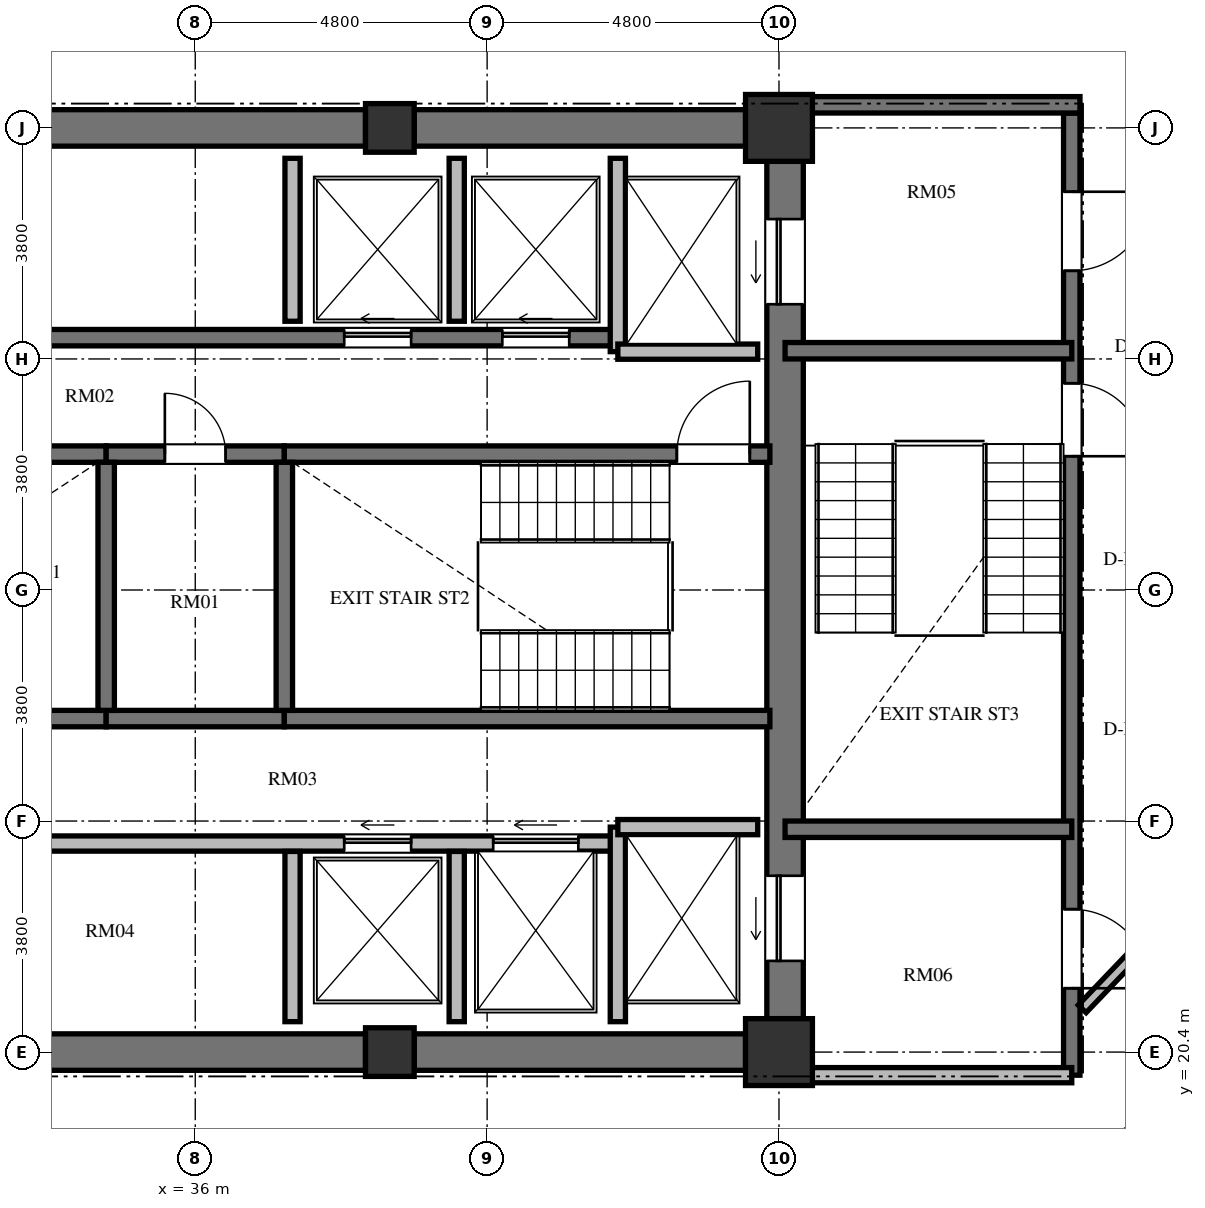
"""IFC4 building model, lengths in metres.
Left out: names, types, materials, properties, quantities, classifications, styles, units other than length and angle.
Written with IfcOpenShell. Run it as: python <this file> out.ifc"""

import sys

from ifc_helpers import new_model, si_unit, direction, frame, frame_2d, origin, origin_2d, place, context, subcontext, project, spatial, rectangle, extrude, element, fill, save


model = new_model("IFC4")
c1 = context("Model", 3, precision=1e-05, world=origin(), true_north=direction((0.0, 1.0)))
c2 = subcontext(c1, "Body", "Model", "MODEL_VIEW")
j1 = project(units=[si_unit("LENGTHUNIT", "METRE"), si_unit("PLANEANGLEUNIT", "RADIAN")], contexts=[c1])
p1 = place(None, origin())
s1 = spatial("IfcSite", under=j1, at=p1, CompositionType="ELEMENT")
p2 = place(p1, origin())
s2 = spatial("IfcBuilding", under=s1, at=p2, CompositionType="ELEMENT")
p3 = place(p2, frame((0.0, 0.0, 198.48)))
s3 = spatial("IfcBuildingStorey", under=s2, at=p3, CompositionType="ELEMENT", Elevation=198.48)
p4 = place(p3, frame((39.2, 20.4, 0.0), z_axis=(0.0, 0.0, 1.0), x_axis=(1.0, 0.0, 0.0)))
e1 = element("IfcColumn", 1, at=p4, inside=s3, PredefinedType="COLUMN", context=c2, shape_type="SweptSolid", body=[
    extrude(rectangle(XDim=0.8, YDim=0.8, at=origin_2d()), origin(), (0.0, 0.0, 1.0), 3.648),
])
for number, where, z_axis, x_axis in (
    (2, (45.6, 20.4, 0.0), (0.0, 0.0, 1.0), (1.0, 0.0, 0.0)),
    (3, (45.6, 35.6, 0.0), (0.0, 0.0, 1.0), (1.0, 0.0, 0.0)),
):
    element("IfcColumn", number, at=place(p3, frame(where, z_axis=z_axis, x_axis=x_axis)), inside=s3, PredefinedType="COLUMN", context=c2, shape_type="SweptSolid", body=[
        extrude(rectangle(XDim=1.1, YDim=1.1, at=origin_2d()), origin(), (0.0, 0.0, 1.0), 3.648),
    ])
p5 = place(p3, frame((39.2, 35.6, 0.0), z_axis=(0.0, 0.0, 1.0), x_axis=(1.0, 0.0, 0.0)))
e4 = element("IfcColumn", 4, at=p5, inside=s3, PredefinedType="COLUMN", context=c2, shape_type="SweptSolid", body=[
    extrude(rectangle(XDim=0.8, YDim=0.8, at=origin_2d()), origin(), (0.0, 0.0, 1.0), 3.648),
])
p6 = place(p3, frame((45.7, 20.95, 0.0), z_axis=(0.0, 0.0, 1.0), x_axis=(0.0, 1.0, 0.0)))
e5 = element("IfcWall", 5, at=p6, inside=s3, PredefinedType="SHEAR", context=c2, shape_type="SweptSolid", body=[
    extrude(rectangle(XDim=14.1, YDim=0.6, at=frame_2d((7.05, 0.0))), origin(), (0.0, 0.0, 1.0), 3.648),
])
p7 = place(p6, frame((11.75, 0.0, 0.0)))
e6 = element("IfcOpeningElement", 6, at=p7, cuts=e5, PredefinedType="OPENING", context=c2, shape_type="SweptSolid", body=[
    extrude(rectangle(XDim=1.4, YDim=2.3, at=frame_2d((0.7, 1.15))), frame((0.0, 0.31, 0.0), z_axis=(0.0, -1.0, 0.0), x_axis=(1.0, 0.0, 0.0)), (0.0, 0.0, 1.0), 0.62),
])
p8 = place(p6, frame((0.95, 0.0, 0.0)))
e7 = element("IfcOpeningElement", 7, at=p8, cuts=e5, PredefinedType="OPENING", context=c2, shape_type="SweptSolid", body=[
    extrude(rectangle(XDim=1.4, YDim=2.3, at=frame_2d((0.7, 1.15))), frame((0.0, 0.31, 0.0), z_axis=(0.0, -1.0, 0.0), x_axis=(1.0, 0.0, 0.0)), (0.0, 0.0, 1.0), 0.62),
])
for number, where, z_axis, x_axis in (
    (8, (33.2, 20.4, 0.0), (0.0, 0.0, 1.0), (1.0, 0.0, 0.0)),
    (9, (33.2, 35.6, 0.0), (0.0, 0.0, 1.0), (1.0, 0.0, 0.0)),
):
    element("IfcWall", number, at=place(p3, frame(where, z_axis=z_axis, x_axis=x_axis)), inside=s3, PredefinedType="SHEAR", context=c2, shape_type="SweptSolid", body=[
        extrude(rectangle(XDim=5.6, YDim=0.6, at=frame_2d((2.8, 0.0))), origin(), (0.0, 0.0, 1.0), 3.648),
    ])
for number, where, z_axis, x_axis in (
    (10, (39.6, 20.4, 0.0), (0.0, 0.0, 1.0), (1.0, 0.0, 0.0)),
    (11, (39.6, 35.6, 0.0), (0.0, 0.0, 1.0), (1.0, 0.0, 0.0)),
):
    element("IfcWall", number, at=place(p3, frame(where, z_axis=z_axis, x_axis=x_axis)), inside=s3, PredefinedType="SHEAR", context=c2, shape_type="SweptSolid", body=[
        extrude(rectangle(XDim=5.45, YDim=0.6, at=frame_2d((2.725, 0.0))), origin(), (0.0, 0.0, 1.0), 3.648),
    ])
p9 = place(p3, frame((26.55, 30.235, 0.0), z_axis=(0.0, 0.0, 1.0), x_axis=(1.0, 0.0, 0.0)))
e12 = element("IfcWall", 12, at=p9, inside=s3, PredefinedType="SHEAR", context=c2, shape_type="SweptSolid", body=[
    extrude(rectangle(XDim=7.985, YDim=0.27, at=frame_2d((3.992, 0.0))), origin(), (0.0, 0.0, 1.0), 3.648),
])
p10 = place(p3, frame((34.535, 30.235, 0.0), z_axis=(0.0, 0.0, 1.0), x_axis=(1.0, 0.0, 0.0)))
e13 = element("IfcWall", 13, at=p10, inside=s3, PredefinedType="SHEAR", context=c2, shape_type="SweptSolid", body=[
    extrude(rectangle(XDim=2.93, YDim=0.27, at=frame_2d((1.465, 0.0))), origin(), (0.0, 0.0, 1.0), 3.648),
])
p11 = place(p10, frame((0.965, 0.0, 0.0)))
e14 = element("IfcOpeningElement", 14, at=p11, cuts=e13, PredefinedType="OPENING", context=c2, shape_type="SweptSolid", body=[
    extrude(rectangle(XDim=1.0, YDim=2.1, at=frame_2d((0.5, 1.05))), frame((0.0, 0.145, 0.0), z_axis=(0.0, -1.0, 0.0), x_axis=(1.0, 0.0, 0.0)), (0.0, 0.0, 1.0), 0.29),
])
p12 = place(p3, frame((37.465, 30.235, 0.0), z_axis=(0.0, 0.0, 1.0), x_axis=(1.0, 0.0, 0.0)))
e15 = element("IfcWall", 15, at=p12, inside=s3, PredefinedType="SHEAR", context=c2, shape_type="SweptSolid", body=[
    extrude(rectangle(XDim=7.985, YDim=0.27, at=frame_2d((3.992, 0.0))), origin(), (0.0, 0.0, 1.0), 3.648),
])
p13 = place(p12, frame((6.455, 0.0, 0.0)))
e16 = element("IfcOpeningElement", 16, at=p13, cuts=e15, PredefinedType="OPENING", context=c2, shape_type="SweptSolid", body=[
    extrude(rectangle(XDim=1.2, YDim=2.15, at=frame_2d((0.6, 1.075))), frame((0.0, 0.145, 0.0), z_axis=(0.0, -1.0, 0.0), x_axis=(1.0, 0.0, 0.0)), (0.0, 0.0, 1.0), 0.29),
])
p14 = place(p3, frame((26.55, 25.885, 0.0), z_axis=(0.0, 0.0, 1.0), x_axis=(1.0, 0.0, 0.0)))
e17 = element("IfcWall", 17, at=p14, inside=s3, PredefinedType="SHEAR", context=c2, shape_type="SweptSolid", body=[
    extrude(rectangle(XDim=7.985, YDim=0.27, at=frame_2d((3.992, 0.0))), origin(), (0.0, 0.0, 1.0), 3.648),
])
p15 = place(p3, frame((34.535, 25.885, 0.0), z_axis=(0.0, 0.0, 1.0), x_axis=(1.0, 0.0, 0.0)))
e18 = element("IfcWall", 18, at=p15, inside=s3, PredefinedType="SHEAR", context=c2, shape_type="SweptSolid", body=[
    extrude(rectangle(XDim=2.93, YDim=0.27, at=frame_2d((1.465, 0.0))), origin(), (0.0, 0.0, 1.0), 3.648),
])
p16 = place(p3, frame((37.465, 25.885, 0.0), z_axis=(0.0, 0.0, 1.0), x_axis=(1.0, 0.0, 0.0)))
e19 = element("IfcWall", 19, at=p16, inside=s3, PredefinedType="SHEAR", context=c2, shape_type="SweptSolid", body=[
    extrude(rectangle(XDim=7.985, YDim=0.27, at=frame_2d((3.992, 0.0))), origin(), (0.0, 0.0, 1.0), 3.648),
])
for number, where, z_axis, x_axis in (
    (20, (34.535, 26.02, 0.0), (0.0, 0.0, 1.0), (0.0, 1.0, 0.0)),
    (21, (37.465, 26.02, 0.0), (0.0, 0.0, 1.0), (0.0, 1.0, 0.0)),
):
    element("IfcWall", number, at=place(p3, frame(where, z_axis=z_axis, x_axis=x_axis)), inside=s3, PredefinedType="SHEAR", context=c2, shape_type="SweptSolid", body=[
        extrude(rectangle(XDim=4.08, YDim=0.27, at=frame_2d((2.04, 0.0))), origin(), (0.0, 0.0, 1.0), 3.648),
    ])
p17 = place(p3, frame((26.55, 32.15, 0.0), z_axis=(0.0, 0.0, 1.0), x_axis=(1.0, 0.0, 0.0)))
e22 = element("IfcWall", 22, at=p17, inside=s3, PredefinedType="SHEAR", context=c2, shape_type="SweptSolid", body=[
    extrude(rectangle(XDim=16.4, YDim=0.27, at=frame_2d((8.2, 0.0))), origin(), (0.0, 0.0, 1.0), 3.648),
])
p18 = place(p17, frame((5.125, 0.0, 0.0)))
e23 = element("IfcOpeningElement", 23, at=p18, cuts=e22, PredefinedType="OPENING", context=c2, shape_type="SweptSolid", body=[
    extrude(rectangle(XDim=1.05, YDim=2.15, at=frame_2d((0.525, 1.075))), frame((0.0, 0.145, 0.0), z_axis=(0.0, -1.0, 0.0), x_axis=(1.0, 0.0, 0.0)), (0.0, 0.0, 1.0), 0.29),
])
p19 = place(p17, frame((11.9, 0.0, 0.0)))
e24 = element("IfcOpeningElement", 24, at=p19, cuts=e22, PredefinedType="OPENING", context=c2, shape_type="SweptSolid", body=[
    extrude(rectangle(XDim=1.1, YDim=2.2, at=frame_2d((0.55, 1.1))), frame((0.0, 0.145, 0.0), z_axis=(0.0, -1.0, 0.0), x_axis=(1.0, 0.0, 0.0)), (0.0, 0.0, 1.0), 0.29),
])
p20 = place(p17, frame((14.5, 0.0, 0.0)))
e25 = element("IfcOpeningElement", 25, at=p20, cuts=e22, PredefinedType="OPENING", context=c2, shape_type="SweptSolid", body=[
    extrude(rectangle(XDim=1.1, YDim=2.2, at=frame_2d((0.55, 1.1))), frame((0.0, 0.145, 0.0), z_axis=(0.0, -1.0, 0.0), x_axis=(1.0, 0.0, 0.0)), (0.0, 0.0, 1.0), 0.29),
])
p21 = place(p3, frame((26.75, 23.83, 0.0), z_axis=(0.0, 0.0, 1.0), x_axis=(1.0, 0.0, 0.0)))
e26 = element("IfcWall", 26, at=p21, inside=s3, PredefinedType="SOLIDWALL", context=c2, shape_type="SweptSolid", body=[
    extrude(rectangle(XDim=16.2, YDim=0.25, at=frame_2d((8.1, 0.0))), origin(), (0.0, 0.0, 1.0), 3.448),
])
p22 = place(p21, frame((4.75, 0.0, 0.0)))
e27 = element("IfcOpeningElement", 27, at=p22, cuts=e26, PredefinedType="OPENING", context=c2, shape_type="SweptSolid", body=[
    extrude(rectangle(XDim=1.4, YDim=2.2, at=frame_2d((0.7, 1.1))), frame((0.0, 0.135, 0.0), z_axis=(0.0, -1.0, 0.0), x_axis=(1.0, 0.0, 0.0)), (0.0, 0.0, 1.0), 0.27),
])
p23 = place(p21, frame((11.7, 0.0, 0.0)))
e28 = element("IfcOpeningElement", 28, at=p23, cuts=e26, PredefinedType="OPENING", context=c2, shape_type="SweptSolid", body=[
    extrude(rectangle(XDim=1.1, YDim=2.2, at=frame_2d((0.55, 1.1))), frame((0.0, 0.135, 0.0), z_axis=(0.0, -1.0, 0.0), x_axis=(1.0, 0.0, 0.0)), (0.0, 0.0, 1.0), 0.27),
])
p24 = place(p21, frame((14.15, 0.0, 0.0)))
e29 = element("IfcOpeningElement", 29, at=p24, cuts=e26, PredefinedType="OPENING", context=c2, shape_type="SweptSolid", body=[
    extrude(rectangle(XDim=1.4, YDim=2.3, at=frame_2d((0.7, 1.15))), frame((0.0, 0.135, 0.0), z_axis=(0.0, -1.0, 0.0), x_axis=(1.0, 0.0, 0.0)), (0.0, 0.0, 1.0), 0.27),
])
p25 = place(p3, frame((42.95, 31.92, 0.0), z_axis=(0.0, 0.0, 1.0), x_axis=(0.0, 1.0, 0.0)))
e30 = element("IfcWall", 30, at=p25, inside=s3, PredefinedType="SOLIDWALL", context=c2, shape_type="SweptSolid", body=[
    extrude(rectangle(XDim=3.18, YDim=0.25, at=frame_2d((1.59, 0.0))), origin(), (0.0, 0.0, 1.0), 3.448),
])
p26 = place(p3, frame((42.95, 31.92, 0.0), z_axis=(0.0, 0.0, 1.0), x_axis=(1.0, 0.0, 0.0)))
e31 = element("IfcWall", 31, at=p26, inside=s3, PredefinedType="SOLIDWALL", context=c2, shape_type="SweptSolid", body=[
    extrude(rectangle(XDim=2.3, YDim=0.25, at=frame_2d((1.15, 0.0))), origin(), (0.0, 0.0, 1.0), 3.448),
])
p27 = place(p3, frame((42.95, 20.9, 0.0), z_axis=(0.0, 0.0, 1.0), x_axis=(0.0, 1.0, 0.0)))
e32 = element("IfcWall", 32, at=p27, inside=s3, PredefinedType="SOLIDWALL", context=c2, shape_type="SweptSolid", body=[
    extrude(rectangle(XDim=3.2, YDim=0.25, at=frame_2d((1.6, 0.0))), origin(), (0.0, 0.0, 1.0), 3.448),
])
p28 = place(p3, frame((42.95, 24.1, 0.0), z_axis=(0.0, 0.0, 1.0), x_axis=(1.0, 0.0, 0.0)))
e33 = element("IfcWall", 33, at=p28, inside=s3, PredefinedType="SOLIDWALL", context=c2, shape_type="SweptSolid", body=[
    extrude(rectangle(XDim=2.3, YDim=0.25, at=frame_2d((1.15, 0.0))), origin(), (0.0, 0.0, 1.0), 3.448),
])
p29 = place(p3, frame((37.6, 32.42, 0.0), z_axis=(0.0, 0.0, 1.0), x_axis=(0.0, 1.0, 0.0)))
e34 = element("IfcWall", 34, at=p29, inside=s3, PredefinedType="SOLIDWALL", context=c2, shape_type="SweptSolid", body=[
    extrude(rectangle(XDim=2.68, YDim=0.25, at=frame_2d((1.34, 0.0))), origin(), (0.0, 0.0, 1.0), 3.448),
])
p30 = place(p3, frame((37.6, 20.9, 0.0), z_axis=(0.0, 0.0, 1.0), x_axis=(0.0, 1.0, 0.0)))
e35 = element("IfcWall", 35, at=p30, inside=s3, PredefinedType="SOLIDWALL", context=c2, shape_type="SweptSolid", body=[
    extrude(rectangle(XDim=2.8, YDim=0.25, at=frame_2d((1.4, 0.0))), origin(), (0.0, 0.0, 1.0), 3.448),
])
p31 = place(p3, frame((40.3, 32.42, 0.0), z_axis=(0.0, 0.0, 1.0), x_axis=(0.0, 1.0, 0.0)))
e36 = element("IfcWall", 36, at=p31, inside=s3, PredefinedType="SOLIDWALL", context=c2, shape_type="SweptSolid", body=[
    extrude(rectangle(XDim=2.68, YDim=0.25, at=frame_2d((1.34, 0.0))), origin(), (0.0, 0.0, 1.0), 3.448),
])
p32 = place(p3, frame((40.3, 20.9, 0.0), z_axis=(0.0, 0.0, 1.0), x_axis=(0.0, 1.0, 0.0)))
e37 = element("IfcWall", 37, at=p32, inside=s3, PredefinedType="SOLIDWALL", context=c2, shape_type="SweptSolid", body=[
    extrude(rectangle(XDim=2.8, YDim=0.25, at=frame_2d((1.4, 0.0))), origin(), (0.0, 0.0, 1.0), 3.448),
])
p33 = place(p3, frame((50.415, 35.845, 0.0), z_axis=(0.0, 0.0, 1.0), x_axis=(0.0, -1.0, 0.0)))
e38 = element("IfcWall", 38, at=p33, inside=s3, PredefinedType="SHEAR", context=c2, shape_type="SweptSolid", body=[
    extrude(rectangle(XDim=15.825, YDim=0.27, at=frame_2d((7.913, 0.0))), origin(), (0.0, 0.0, 1.0), 3.648),
])
p34 = place(p33, frame((4.445, 0.0, 0.0)))
e39 = element("IfcOpeningElement", 39, at=p34, cuts=e38, PredefinedType="OPENING", context=c2, shape_type="SweptSolid", body=[
    extrude(rectangle(XDim=1.2, YDim=2.15, at=frame_2d((0.6, 1.075))), frame((0.0, 0.145, 0.0), z_axis=(0.0, -1.0, 0.0), x_axis=(1.0, 0.0, 0.0)), (0.0, 0.0, 1.0), 0.29),
])
p35 = place(p33, frame((1.295, 0.0, 0.0)))
e40 = element("IfcOpeningElement", 40, at=p35, cuts=e38, PredefinedType="OPENING", context=c2, shape_type="SweptSolid", body=[
    extrude(rectangle(XDim=1.3, YDim=2.2, at=frame_2d((0.65, 1.1))), frame((0.0, 0.145, 0.0), z_axis=(0.0, -1.0, 0.0), x_axis=(1.0, 0.0, 0.0)), (0.0, 0.0, 1.0), 0.29),
])
p36 = place(p33, frame((13.095, 0.0, 0.0)))
e41 = element("IfcOpeningElement", 41, at=p36, cuts=e38, PredefinedType="OPENING", context=c2, shape_type="SweptSolid", body=[
    extrude(rectangle(XDim=1.3, YDim=2.2, at=frame_2d((0.65, 1.1))), frame((0.0, 0.145, 0.0), z_axis=(0.0, -1.0, 0.0), x_axis=(1.0, 0.0, 0.0)), (0.0, 0.0, 1.0), 0.29),
])
p37 = place(p3, frame((46.0, 35.98, 0.0), z_axis=(0.0, 0.0, 1.0), x_axis=(1.0, 0.0, 0.0)))
e42 = element("IfcWall", 42, at=p37, inside=s3, PredefinedType="SHEAR", context=c2, shape_type="SweptSolid", body=[
    extrude(rectangle(XDim=4.55, YDim=0.27, at=frame_2d((2.275, 0.0))), origin(), (0.0, 0.0, 1.0), 3.648),
])
for number, where, z_axis, x_axis in (
    (43, (45.7, 31.935, 0.0), (0.0, 0.0, 1.0), (1.0, 0.0, 0.0)),
    (44, (45.7, 24.065, 0.0), (0.0, 0.0, 1.0), (1.0, 0.0, 0.0)),
):
    element("IfcWall", number, at=place(p3, frame(where, z_axis=z_axis, x_axis=x_axis)), inside=s3, PredefinedType="SHEAR", context=c2, shape_type="SweptSolid", body=[
        extrude(rectangle(XDim=4.715, YDim=0.27, at=frame_2d((2.357, 0.0))), origin(), (0.0, 0.0, 1.0), 3.648),
    ])
p38 = place(p3, frame((45.7, 20.02, 0.0), z_axis=(0.0, 0.0, 1.0), x_axis=(1.0, 0.0, 0.0)))
e45 = element("IfcWall", 45, at=p38, inside=s3, PredefinedType="SOLIDWALL", context=c2, shape_type="SweptSolid", body=[
    extrude(rectangle(XDim=4.715, YDim=0.25, at=frame_2d((2.357, 0.0))), origin(), (0.0, 0.0, 1.0), 3.448),
])
p39 = place(p3, frame((53.078, 23.714, 0.0), z_axis=(0.0, 0.0, 1.0), x_axis=(-0.691353379446, -0.722516785085, 0.0)))
e46 = element("IfcWall", 46, at=p39, inside=s3, PredefinedType="PARTITIONING", context=c2, shape_type="SweptSolid", body=[
    extrude(rectangle(XDim=3.604, YDim=0.18, at=frame_2d((1.802, 0.0))), origin(), (0.0, 0.0, 1.0), 3.448),
])
p40 = place(p13, origin())
e47 = element("IfcDoor", 47, at=p40, inside=s3, OperationType="SINGLE_SWING_RIGHT", PredefinedType="DOOR", context=c2, shape_type="SweptSolid", body=[
    extrude(rectangle(XDim=1.2, YDim=2.15, at=frame_2d((0.6, 1.075))), frame((0.0, 0.025, 0.0), z_axis=(0.0, -1.0, 0.0), x_axis=(1.0, 0.0, 0.0)), (0.0, 0.0, 1.0), 0.05),
])
fill(e16, e47)
p41 = place(p11, origin())
e48 = element("IfcDoor", 48, at=p41, inside=s3, OperationType="SINGLE_SWING_LEFT", PredefinedType="DOOR", context=c2, shape_type="SweptSolid", body=[
    extrude(rectangle(XDim=1.0, YDim=2.1, at=frame_2d((0.5, 1.05))), frame((0.0, 0.025, 0.0), z_axis=(0.0, -1.0, 0.0), x_axis=(1.0, 0.0, 0.0)), (0.0, 0.0, 1.0), 0.05),
])
fill(e14, e48)
p42 = place(p19, origin())
e49 = element("IfcDoor", 49, at=p42, inside=s3, OperationType="SLIDING_TO_LEFT", PredefinedType="DOOR", context=c2, shape_type="SweptSolid", body=[
    extrude(rectangle(XDim=1.1, YDim=2.2, at=frame_2d((0.55, 1.1))), frame((0.0, 0.025, 0.0), z_axis=(0.0, -1.0, 0.0), x_axis=(1.0, 0.0, 0.0)), (0.0, 0.0, 1.0), 0.05),
])
fill(e24, e49)
p43 = place(p20, origin())
e50 = element("IfcDoor", 50, at=p43, inside=s3, OperationType="SLIDING_TO_LEFT", PredefinedType="DOOR", context=c2, shape_type="SweptSolid", body=[
    extrude(rectangle(XDim=1.1, YDim=2.2, at=frame_2d((0.55, 1.1))), frame((0.0, 0.025, 0.0), z_axis=(0.0, -1.0, 0.0), x_axis=(1.0, 0.0, 0.0)), (0.0, 0.0, 1.0), 0.05),
])
fill(e25, e50)
p44 = place(p23, origin())
e51 = element("IfcDoor", 51, at=p44, inside=s3, OperationType="SLIDING_TO_LEFT", PredefinedType="DOOR", context=c2, shape_type="SweptSolid", body=[
    extrude(rectangle(XDim=1.1, YDim=2.2, at=frame_2d((0.55, 1.1))), frame((0.0, 0.025, 0.0), z_axis=(0.0, -1.0, 0.0), x_axis=(1.0, 0.0, 0.0)), (0.0, 0.0, 1.0), 0.05),
])
fill(e28, e51)
p45 = place(p7, origin())
e52 = element("IfcDoor", 52, at=p45, inside=s3, OperationType="SLIDING_TO_LEFT", PredefinedType="DOOR", context=c2, shape_type="SweptSolid", body=[
    extrude(rectangle(XDim=1.4, YDim=2.3, at=frame_2d((0.7, 1.15))), frame((0.0, 0.025, 0.0), z_axis=(0.0, -1.0, 0.0), x_axis=(1.0, 0.0, 0.0)), (0.0, 0.0, 1.0), 0.05),
])
fill(e6, e52)
p46 = place(p8, origin())
e53 = element("IfcDoor", 53, at=p46, inside=s3, OperationType="SLIDING_TO_LEFT", PredefinedType="DOOR", context=c2, shape_type="SweptSolid", body=[
    extrude(rectangle(XDim=1.4, YDim=2.3, at=frame_2d((0.7, 1.15))), frame((0.0, 0.025, 0.0), z_axis=(0.0, -1.0, 0.0), x_axis=(1.0, 0.0, 0.0)), (0.0, 0.0, 1.0), 0.05),
])
fill(e7, e53)
p47 = place(p24, origin())
e54 = element("IfcDoor", 54, at=p47, inside=s3, OperationType="SLIDING_TO_LEFT", PredefinedType="DOOR", context=c2, shape_type="SweptSolid", body=[
    extrude(rectangle(XDim=1.4, YDim=2.3, at=frame_2d((0.7, 1.15))), frame((0.0, 0.025, 0.0), z_axis=(0.0, -1.0, 0.0), x_axis=(1.0, 0.0, 0.0)), (0.0, 0.0, 1.0), 0.05),
])
fill(e29, e54)
p48 = place(p34, origin())
e55 = element("IfcDoor", 55, at=p48, inside=s3, OperationType="SINGLE_SWING_RIGHT", PredefinedType="DOOR", context=c2, shape_type="SweptSolid", body=[
    extrude(rectangle(XDim=1.2, YDim=2.15, at=frame_2d((0.6, 1.075))), frame((0.0, 0.025, 0.0), z_axis=(0.0, -1.0, 0.0), x_axis=(1.0, 0.0, 0.0)), (0.0, 0.0, 1.0), 0.05),
])
fill(e39, e55)
p49 = place(p35, origin())
e56 = element("IfcDoor", 56, at=p49, inside=s3, OperationType="SINGLE_SWING_LEFT", PredefinedType="DOOR", context=c2, shape_type="SweptSolid", body=[
    extrude(rectangle(XDim=1.3, YDim=2.2, at=frame_2d((0.65, 1.1))), frame((0.0, 0.025, 0.0), z_axis=(0.0, -1.0, 0.0), x_axis=(1.0, 0.0, 0.0)), (0.0, 0.0, 1.0), 0.05),
])
fill(e40, e56)
p50 = place(p36, origin())
e57 = element("IfcDoor", 57, at=p50, inside=s3, OperationType="SINGLE_SWING_RIGHT", PredefinedType="DOOR", context=c2, shape_type="SweptSolid", body=[
    extrude(rectangle(XDim=1.3, YDim=2.2, at=frame_2d((0.65, 1.1))), frame((0.0, 0.025, 0.0), z_axis=(0.0, -1.0, 0.0), x_axis=(1.0, 0.0, 0.0)), (0.0, 0.0, 1.0), 0.05),
])
fill(e41, e57)
save(model, sys.argv[1])
